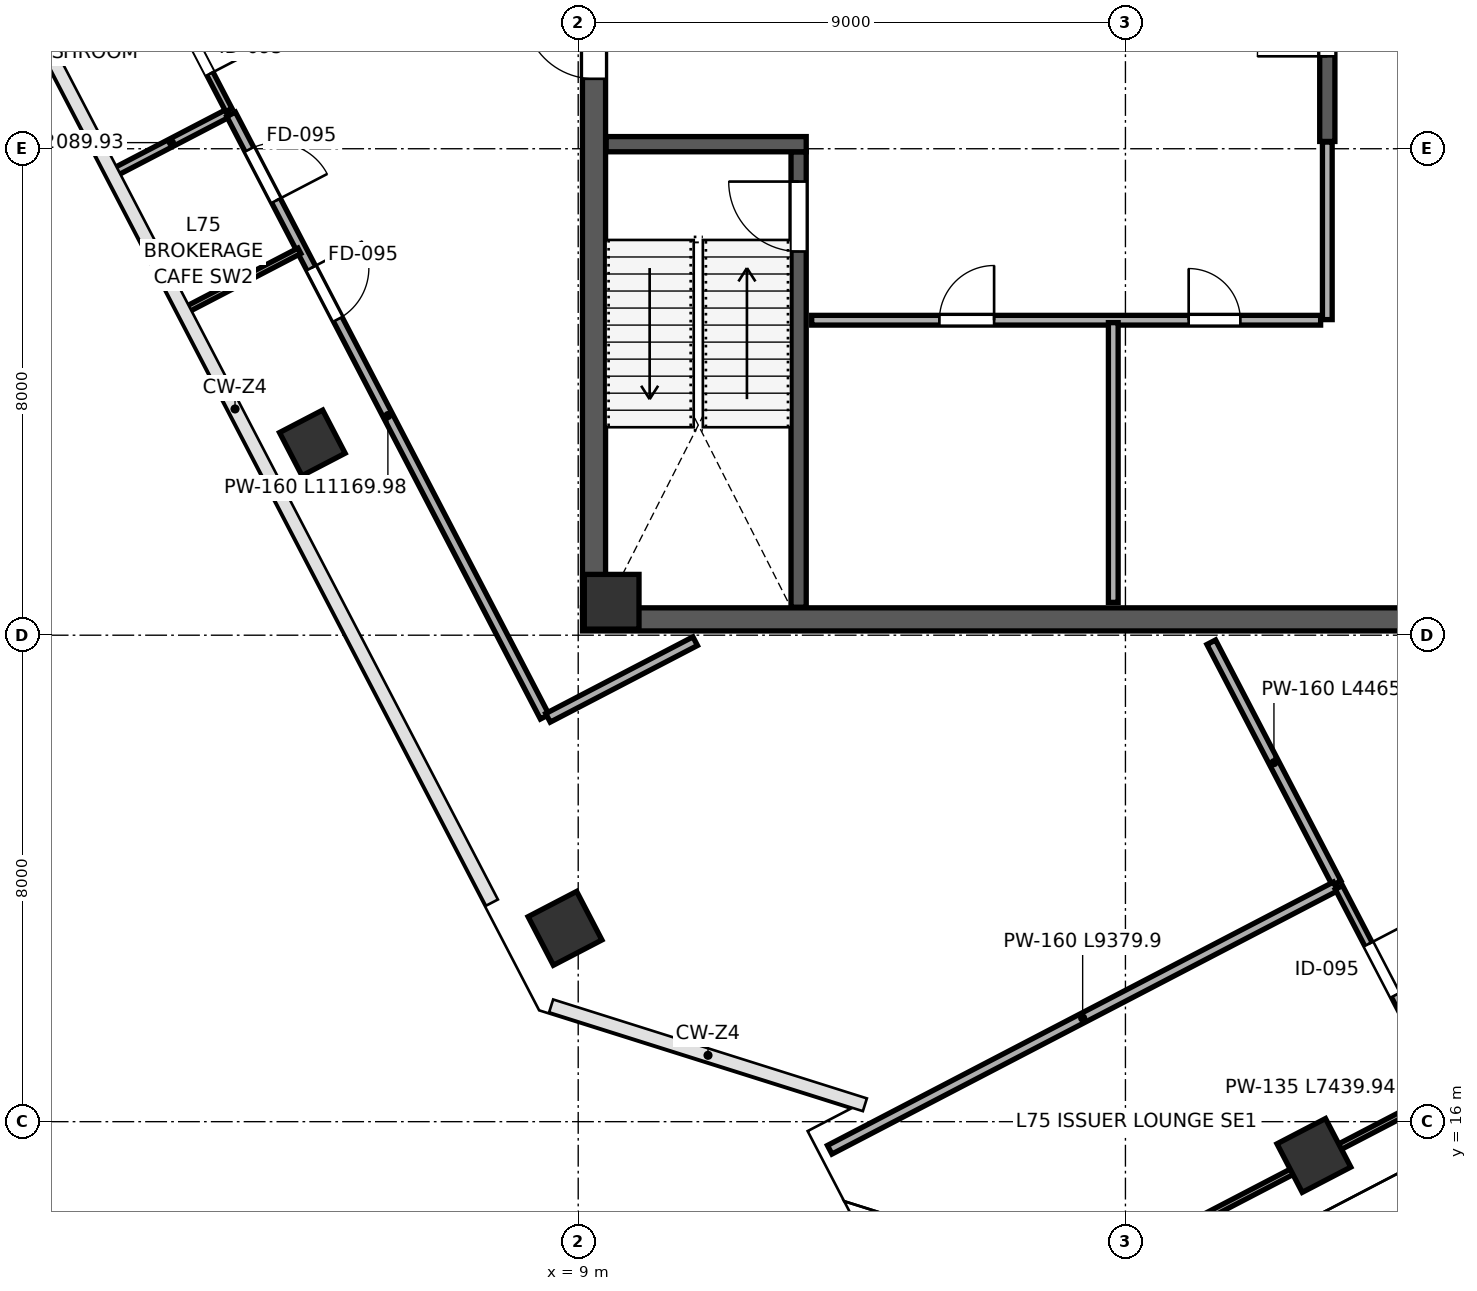
"""IFC4 building model, lengths in metres.
Left out: names, types, materials, properties, quantities, classifications, styles, units other than length and angle.
Written with IfcOpenShell. Run it as: python <this file> out.ifc"""

import sys

from ifc_helpers import new_model, si_unit, direction, frame, frame_2d, origin, origin_2d, place, context, subcontext, project, spatial, rectangle, extrude, source, transform, mapped, element, fill, save


model = new_model("IFC4")
c1 = context("Model", 3, precision=1e-05, world=origin(), true_north=direction((0.0, 1.0)))
c2 = subcontext(c1, "Body", "Model", "MODEL_VIEW")
j1 = project(units=[si_unit("LENGTHUNIT", "METRE"), si_unit("PLANEANGLEUNIT", "RADIAN")], contexts=[c1])
p1 = place(None, origin())
s1 = spatial("IfcSite", under=j1, at=p1, CompositionType="ELEMENT")
p2 = place(p1, origin())
s2 = spatial("IfcBuilding", under=s1, at=p2, CompositionType="ELEMENT")
p3 = place(p2, frame((0.0, 0.0, 332.4)))
s3 = spatial("IfcBuildingStorey", under=s2, at=p3, CompositionType="ELEMENT", Elevation=332.4)
m1 = source(origin(), c2, "Body", "SweptSolid", [
    extrude(rectangle(XDim=0.9, YDim=0.9, at=origin_2d()), origin(), (0.0, 0.0, 1.0), 4.199),
])
p4 = place(p3, frame((9.55, 24.55, 0.001), z_axis=(0.0, 0.0, 1.0), x_axis=(1.0, 0.0, 0.0)))
e1 = element("IfcColumn", 1, at=p4, inside=s3, PredefinedType="COLUMN", context=c2, shape_type="MappedRepresentation", body=[
    mapped(m1, transform((0.0, 0.0, 0.0), scale=1.0)),
])
m2 = source(origin(), c2, "Body", "SweptSolid", [
    extrude(rectangle(XDim=0.8, YDim=0.8, at=origin_2d()), origin(), (0.0, 0.0, 1.0), 4.199),
])
p5 = place(p3, frame((4.627, 27.163, 0.001), z_axis=(0.0, 0.0, 1.0), x_axis=(-0.461748613235, 0.887010833178, 0.0)))
e2 = element("IfcColumn", 2, at=p5, inside=s3, PredefinedType="COLUMN", context=c2, shape_type="MappedRepresentation", body=[
    mapped(m2, transform((0.0, 0.0, 0.0), scale=1.0)),
])
m3 = source(origin(), c2, "Body", "SweptSolid", [
    extrude(rectangle(XDim=0.9, YDim=0.9, at=origin_2d()), origin(), (0.0, 0.0, 1.0), 4.199),
])
for number, where, z_axis, x_axis in (
    (3, (8.783, 19.179, 0.001), (0.0, 0.0, 1.0), (-0.462, 0.887, 0.0)),
    (4, (21.099, 15.444, 0.001), (0.0, 0.0, 1.0), (-0.462, 0.887, 0.0)),
):
    element("IfcColumn", number, at=place(p3, frame(where, z_axis=z_axis, x_axis=x_axis)), inside=s3, PredefinedType="COLUMN", context=c2, shape_type="MappedRepresentation", body=[
        mapped(m3, transform((0.0, 0.0, 0.0), scale=1.0)),
    ])
p6 = place(p3, frame((9.26, 24.45, 0.0), z_axis=(0.0, 0.0, 1.0), x_axis=(0.0, 1.0, 0.0)))
e5 = element("IfcWall", 5, at=p6, inside=s3, PredefinedType="SHEAR", context=c2, shape_type="SweptSolid", body=[
    extrude(rectangle(XDim=15.1, YDim=0.38, at=frame_2d((7.55, 0.0))), origin(), (0.0, 0.0, 1.0), 3.96),
])
p7 = place(p6, frame((8.7, 0.0, 0.0)))
e6 = element("IfcOpeningElement", 6, at=p7, cuts=e5, PredefinedType="OPENING", context=c2, shape_type="SweptSolid", body=[
    extrude(rectangle(XDim=1.15, YDim=2.2, at=frame_2d((0.575, 1.1))), frame((0.0, 0.2, 0.0), z_axis=(0.0, -1.0, 0.0), x_axis=(1.0, 0.0, 0.0)), (0.0, 0.0, 1.0), 0.4),
])
p8 = place(p3, frame((9.07, 24.26, 0.0), z_axis=(0.0, 0.0, 1.0), x_axis=(1.0, 0.0, 0.0)))
e7 = element("IfcWall", 7, at=p8, inside=s3, PredefinedType="SHEAR", context=c2, shape_type="SweptSolid", body=[
    extrude(rectangle(XDim=17.86, YDim=0.38, at=frame_2d((8.93, 0.0))), origin(), (0.0, 0.0, 1.0), 3.96),
])
p9 = place(p3, frame((12.625, 24.46, 0.0), z_axis=(0.0, 0.0, 1.0), x_axis=(0.0, 1.0, 0.0)))
e8 = element("IfcWall", 8, at=p9, inside=s3, PredefinedType="SHEAR", context=c2, shape_type="SweptSolid", body=[
    extrude(rectangle(XDim=7.49, YDim=0.25, at=frame_2d((3.745, 0.0))), origin(), (0.0, 0.0, 1.0), 3.96),
])
p10 = place(p9, frame((5.85, 0.0, 0.0)))
e9 = element("IfcOpeningElement", 9, at=p10, cuts=e8, PredefinedType="OPENING", context=c2, shape_type="SweptSolid", body=[
    extrude(rectangle(XDim=1.15, YDim=2.2, at=frame_2d((0.575, 1.1))), frame((0.0, 0.135, 0.0), z_axis=(0.0, -1.0, 0.0), x_axis=(1.0, 0.0, 0.0)), (0.0, 0.0, 1.0), 0.27),
])
p11 = place(p3, frame((9.46, 32.075, 0.0), z_axis=(0.0, 0.0, 1.0), x_axis=(1.0, 0.0, 0.0)))
e10 = element("IfcWall", 10, at=p11, inside=s3, PredefinedType="SHEAR", context=c2, shape_type="SweptSolid", body=[
    extrude(rectangle(XDim=3.29, YDim=0.25, at=frame_2d((1.645, 0.0))), origin(), (0.0, 0.0, 1.0), 3.96),
])
p12 = place(p3, frame((21.32, 32.12, 0.0), z_axis=(0.0, 0.0, 1.0), x_axis=(0.0, 1.0, 0.0)))
e11 = element("IfcWall", 11, at=p12, inside=s3, PredefinedType="SHEAR", context=c2, shape_type="SweptSolid", body=[
    extrude(rectangle(XDim=7.42, YDim=0.25, at=frame_2d((3.71, 0.0))), origin(), (0.0, 0.0, 1.0), 3.96),
])
p13 = place(p12, frame((1.4, 0.0, 0.0)))
e12 = element("IfcOpeningElement", 12, at=p13, cuts=e11, PredefinedType="OPENING", context=c2, shape_type="SweptSolid", body=[
    extrude(rectangle(XDim=1.15, YDim=2.2, at=frame_2d((0.575, 1.1))), frame((0.0, 0.135, 0.0), z_axis=(0.0, -1.0, 0.0), x_axis=(1.0, 0.0, 0.0)), (0.0, 0.0, 1.0), 0.27),
])
p14 = place(p3, frame((12.84, 29.18, 0.0), z_axis=(0.0, 0.0, 1.0), x_axis=(1.0, 0.0, 0.0)))
e13 = element("IfcWall", 13, at=p14, inside=s3, PredefinedType="PARTITIONING", context=c2, shape_type="SweptSolid", body=[
    extrude(rectangle(XDim=8.37, YDim=0.16, at=frame_2d((4.185, 0.0))), origin(), (0.0, 0.0, 1.0), 3.96),
])
p15 = place(p14, frame((2.1, 0.0, 0.0)))
e14 = element("IfcOpeningElement", 14, at=p15, cuts=e13, PredefinedType="OPENING", context=c2, shape_type="SweptSolid", body=[
    extrude(rectangle(XDim=0.9, YDim=2.15, at=frame_2d((0.45, 1.075))), frame((0.0, 0.09, 0.0), z_axis=(0.0, -1.0, 0.0), x_axis=(1.0, 0.0, 0.0)), (0.0, 0.0, 1.0), 0.18),
])
p16 = place(p14, frame((6.2, 0.0, 0.0)))
e15 = element("IfcOpeningElement", 15, at=p16, cuts=e13, PredefinedType="OPENING", context=c2, shape_type="SweptSolid", body=[
    extrude(rectangle(XDim=0.85, YDim=2.1, at=frame_2d((0.425, 1.05))), frame((0.0, 0.09, 0.0), z_axis=(0.0, -1.0, 0.0), x_axis=(1.0, 0.0, 0.0)), (0.0, 0.0, 1.0), 0.18),
])
p17 = place(p3, frame((17.8, 24.54, 0.0), z_axis=(0.0, 0.0, 1.0), x_axis=(0.0, 1.0, 0.0)))
e16 = element("IfcWall", 16, at=p17, inside=s3, PredefinedType="PARTITIONING", context=c2, shape_type="SweptSolid", body=[
    extrude(rectangle(XDim=4.6, YDim=0.16, at=frame_2d((2.3, 0.0))), origin(), (0.0, 0.0, 1.0), 3.96),
])
p18 = place(p3, frame((21.32, 29.19, 0.0), z_axis=(0.0, 0.0, 1.0), x_axis=(0.0, 1.0, 0.0)))
e17 = element("IfcWall", 17, at=p18, inside=s3, PredefinedType="PARTITIONING", context=c2, shape_type="SweptSolid", body=[
    extrude(rectangle(XDim=2.92, YDim=0.16, at=frame_2d((1.46, 0.0))), origin(), (0.0, 0.0, 1.0), 3.96),
])
p19 = place(p3, frame((1.383, 31.618, 0.0), z_axis=(0.0, 0.0, 1.0), x_axis=(0.887067577271, 0.461639592491, 0.0)))
e18 = element("IfcWall", 18, at=p19, inside=s3, PredefinedType="PARTITIONING", context=c2, shape_type="SweptSolid", body=[
    extrude(rectangle(XDim=2.09, YDim=0.135, at=frame_2d((1.045, 0.0))), origin(), (0.0, 0.0, 1.0), 3.295),
])
p20 = place(p3, frame((0.031, 38.83, 0.0), z_axis=(0.0, 0.0, 1.0), x_axis=(0.461729249278, -0.887020913147, 0.0)))
e19 = element("IfcWall", 19, at=p20, inside=s3, PredefinedType="PARTITIONING", context=c2, shape_type="SweptSolid", body=[
    extrude(rectangle(XDim=6.982, YDim=0.115, at=frame_2d((3.491, 0.0))), origin(), (0.0, 0.0, 1.0), 3.96),
])
p21 = place(p20, frame((0.8, 0.0, 0.0)))
e20 = element("IfcOpeningElement", 20, at=p21, cuts=e19, PredefinedType="OPENING", context=c2, shape_type="SweptSolid", body=[
    extrude(rectangle(XDim=0.9, YDim=2.15, at=frame_2d((0.45, 1.075))), frame((0.0, 0.067, 0.0), z_axis=(0.0, -1.0, 0.0), x_axis=(1.0, 0.0, 0.0)), (0.0, 0.0, 1.0), 0.135),
])
p22 = place(p20, frame((5.36, 0.0, 0.0)))
e21 = element("IfcOpeningElement", 21, at=p22, cuts=e19, PredefinedType="OPENING", context=c2, shape_type="SweptSolid", body=[
    extrude(rectangle(XDim=0.95, YDim=2.15, at=frame_2d((0.475, 1.075))), frame((0.0, 0.067, 0.0), z_axis=(0.0, -1.0, 0.0), x_axis=(1.0, 0.0, 0.0)), (0.0, 0.0, 1.0), 0.135),
])
p23 = place(p3, frame((3.291, 32.566, 0.0), z_axis=(0.0, 0.0, 1.0), x_axis=(0.461745644878, -0.887012378401, 0.0)))
e22 = element("IfcWall", 22, at=p23, inside=s3, PredefinedType="PARTITIONING", context=c2, shape_type="SweptSolid", body=[
    extrude(rectangle(XDim=11.17, YDim=0.16, at=frame_2d((5.585, 0.0))), origin(), (0.0, 0.0, 1.0), 3.96),
])
p24 = place(p23, frame((0.65, 0.0, 0.0)))
e23 = element("IfcOpeningElement", 23, at=p24, cuts=e22, PredefinedType="OPENING", context=c2, shape_type="SweptSolid", body=[
    extrude(rectangle(XDim=0.95, YDim=2.15, at=frame_2d((0.475, 1.075))), frame((0.0, 0.09, 0.0), z_axis=(0.0, -1.0, 0.0), x_axis=(1.0, 0.0, 0.0)), (0.0, 0.0, 1.0), 0.18),
])
p25 = place(p23, frame((2.85, 0.0, 0.0)))
e24 = element("IfcOpeningElement", 24, at=p25, cuts=e22, PredefinedType="OPENING", context=c2, shape_type="SweptSolid", body=[
    extrude(rectangle(XDim=0.95, YDim=2.15, at=frame_2d((0.475, 1.075))), frame((0.0, 0.09, 0.0), z_axis=(0.0, -1.0, 0.0), x_axis=(1.0, 0.0, 0.0)), (0.0, 0.0, 1.0), 0.18),
])
p26 = place(p3, frame((8.503, 22.641, 0.0), z_axis=(0.0, 0.0, 1.0), x_axis=(0.886991176538, 0.461786371328, 0.0)))
e25 = element("IfcWall", 25, at=p26, inside=s3, PredefinedType="PARTITIONING", context=c2, shape_type="SweptSolid", body=[
    extrude(rectangle(XDim=2.729, YDim=0.16, at=frame_2d((1.365, 0.0))), origin(), (0.0, 0.0, 1.0), 3.96),
])
p27 = place(p3, frame((19.411, 23.885, 0.0), z_axis=(0.0, 0.0, 1.0), x_axis=(0.461717603384, -0.887026975196, 0.0)))
e26 = element("IfcWall", 26, at=p27, inside=s3, PredefinedType="PARTITIONING", context=c2, shape_type="SweptSolid", body=[
    extrude(rectangle(XDim=4.466, YDim=0.16, at=frame_2d((2.233, 0.0))), origin(), (0.0, 0.0, 1.0), 3.96),
])
p28 = place(p3, frame((2.561, 29.356, 0.0), z_axis=(0.0, 0.0, 1.0), x_axis=(0.887019740079, 0.461731502835, 0.0)))
e27 = element("IfcWall", 27, at=p28, inside=s3, PredefinedType="PARTITIONING", context=c2, shape_type="SweptSolid", body=[
    extrude(rectangle(XDim=2.09, YDim=0.1, at=frame_2d((1.045, 0.0))), origin(), (0.0, 0.0, 1.0), 3.295),
])
p29 = place(p3, frame((13.136, 15.538, 0.0), z_axis=(0.0, 0.0, 1.0), x_axis=(0.887015145491, 0.461740329265, 0.0)))
e28 = element("IfcWall", 28, at=p29, inside=s3, PredefinedType="PARTITIONING", context=c2, shape_type="SweptSolid", body=[
    extrude(rectangle(XDim=9.38, YDim=0.16, at=frame_2d((4.69, 0.0))), origin(), (0.0, 0.0, 1.0), 3.96),
])
p30 = place(p3, frame((21.51, 19.852, 0.0), z_axis=(0.0, 0.0, 1.0), x_axis=(0.461737048058, -0.887016853532, 0.0)))
e29 = element("IfcWall", 29, at=p30, inside=s3, PredefinedType="PARTITIONING", context=c2, shape_type="SweptSolid", body=[
    extrude(rectangle(XDim=7.44, YDim=0.135, at=frame_2d((3.72, 0.0))), origin(), (0.0, 0.0, 1.0), 3.253),
])
p31 = place(p30, frame((1.05, 0.0, 0.0)))
e30 = element("IfcOpeningElement", 30, at=p31, cuts=e29, PredefinedType="OPENING", context=c2, shape_type="SweptSolid", body=[
    extrude(rectangle(XDim=0.95, YDim=2.15, at=frame_2d((0.475, 1.075))), frame((0.0, 0.078, 0.0), z_axis=(0.0, -1.0, 0.0), x_axis=(1.0, 0.0, 0.0)), (0.0, 0.0, 1.0), 0.155),
])
p32 = place(p30, frame((5.28, 0.0, 0.0)))
e31 = element("IfcOpeningElement", 31, at=p32, cuts=e29, PredefinedType="OPENING", context=c2, shape_type="SweptSolid", body=[
    extrude(rectangle(XDim=0.95, YDim=2.15, at=frame_2d((0.475, 1.075))), frame((0.0, 0.078, 0.0), z_axis=(0.0, -1.0, 0.0), x_axis=(1.0, 0.0, 0.0)), (0.0, 0.0, 1.0), 0.155),
])
p33 = place(p3, frame((14.93, 12.154, 0.0), z_axis=(0.0, 0.0, 1.0), x_axis=(0.887014112301, 0.461742314044, 0.0)))
e32 = element("IfcWall", 32, at=p33, inside=s3, PredefinedType="PARTITIONING", context=c2, shape_type="SweptSolid", body=[
    extrude(rectangle(XDim=9.352, YDim=0.1, at=frame_2d((4.676, 0.0))), origin(), (0.0, 0.0, 1.0), 2.795),
])
m4 = source(origin(), c2, "Body", "SweptSolid", [
    extrude(rectangle(XDim=1.15, YDim=2.2, at=frame_2d((0.575, 1.1))), frame((0.0, 0.025, 0.0), z_axis=(0.0, -1.0, 0.0), x_axis=(1.0, 0.0, 0.0)), (0.0, 0.0, 1.0), 0.05),
])
p34 = place(p10, origin())
e33 = element("IfcDoor", 33, at=p34, inside=s3, OperationType="SINGLE_SWING_RIGHT", PredefinedType="DOOR", context=c2, shape_type="MappedRepresentation", body=[
    mapped(m4, transform((0.0, 0.0, 0.0), scale=1.0)),
])
fill(e9, e33)
m5 = source(origin(), c2, "Body", "SweptSolid", [
    extrude(rectangle(XDim=1.15, YDim=2.2, at=frame_2d((0.575, 1.1))), frame((0.0, 0.025, 0.0), z_axis=(0.0, -1.0, 0.0), x_axis=(1.0, 0.0, 0.0)), (0.0, 0.0, 1.0), 0.05),
])
p35 = place(p13, origin())
e34 = element("IfcDoor", 34, at=p35, inside=s3, OperationType="SINGLE_SWING_LEFT", PredefinedType="DOOR", context=c2, shape_type="MappedRepresentation", body=[
    mapped(m5, transform((0.0, 0.0, 0.0), scale=1.0)),
])
fill(e12, e34)
p36 = place(p7, origin())
e35 = element("IfcDoor", 35, at=p36, inside=s3, OperationType="SINGLE_SWING_RIGHT", PredefinedType="DOOR", context=c2, shape_type="MappedRepresentation", body=[
    mapped(m5, transform((0.0, 0.0, 0.0), scale=1.0)),
])
fill(e6, e35)
m6 = source(origin(), c2, "Body", "SweptSolid", [
    extrude(rectangle(XDim=0.9, YDim=2.15, at=frame_2d((0.45, 1.075))), frame((0.0, 0.025, 0.0), z_axis=(0.0, -1.0, 0.0), x_axis=(1.0, 0.0, 0.0)), (0.0, 0.0, 1.0), 0.05),
])
p37 = place(p15, origin())
e36 = element("IfcDoor", 36, at=p37, inside=s3, OperationType="SINGLE_SWING_RIGHT", PredefinedType="DOOR", context=c2, shape_type="MappedRepresentation", body=[
    mapped(m6, transform((0.0, 0.0, 0.0), scale=1.0)),
])
fill(e14, e36)
m7 = source(origin(), c2, "Body", "SweptSolid", [
    extrude(rectangle(XDim=0.85, YDim=2.1, at=frame_2d((0.425, 1.05))), frame((0.0, 0.025, 0.0), z_axis=(0.0, -1.0, 0.0), x_axis=(1.0, 0.0, 0.0)), (0.0, 0.0, 1.0), 0.05),
])
p38 = place(p16, origin())
e37 = element("IfcDoor", 37, at=p38, inside=s3, OperationType="SINGLE_SWING_LEFT", PredefinedType="DOOR", context=c2, shape_type="MappedRepresentation", body=[
    mapped(m7, transform((0.0, 0.0, 0.0), scale=1.0)),
])
fill(e15, e37)
m8 = source(origin(), c2, "Body", "SweptSolid", [
    extrude(rectangle(XDim=0.95, YDim=2.15, at=frame_2d((0.475, 1.075))), frame((0.0, 0.025, 0.0), z_axis=(0.0, -1.0, 0.0), x_axis=(1.0, 0.0, 0.0)), (0.0, 0.0, 1.0), 0.05),
])
p39 = place(p22, origin())
e38 = element("IfcDoor", 38, at=p39, inside=s3, OperationType="SINGLE_SWING_RIGHT", PredefinedType="DOOR", context=c2, shape_type="MappedRepresentation", body=[
    mapped(m8, transform((0.0, 0.0, 0.0), scale=1.0)),
])
fill(e21, e38)
m9 = source(origin(), c2, "Body", "SweptSolid", [
    extrude(rectangle(XDim=0.95, YDim=2.15, at=frame_2d((0.475, 1.075))), frame((0.0, 0.025, 0.0), z_axis=(0.0, -1.0, 0.0), x_axis=(1.0, 0.0, 0.0)), (0.0, 0.0, 1.0), 0.05),
])
p40 = place(p24, origin())
e39 = element("IfcDoor", 39, at=p40, inside=s3, OperationType="SINGLE_SWING_RIGHT", PredefinedType="DOOR", context=c2, shape_type="MappedRepresentation", body=[
    mapped(m9, transform((0.0, 0.0, 0.0), scale=1.0)),
])
fill(e23, e39)
p41 = place(p25, origin())
e40 = element("IfcDoor", 40, at=p41, inside=s3, OperationType="SINGLE_SWING_LEFT", PredefinedType="DOOR", context=c2, shape_type="MappedRepresentation", body=[
    mapped(m9, transform((0.0, 0.0, 0.0), scale=1.0)),
])
fill(e24, e40)
p42 = place(p31, origin())
e41 = element("IfcDoor", 41, at=p42, inside=s3, OperationType="SINGLE_SWING_LEFT", PredefinedType="DOOR", context=c2, shape_type="MappedRepresentation", body=[
    mapped(m8, transform((0.0, 0.0, 0.0), scale=1.0)),
])
fill(e30, e41)
save(model, sys.argv[1])
